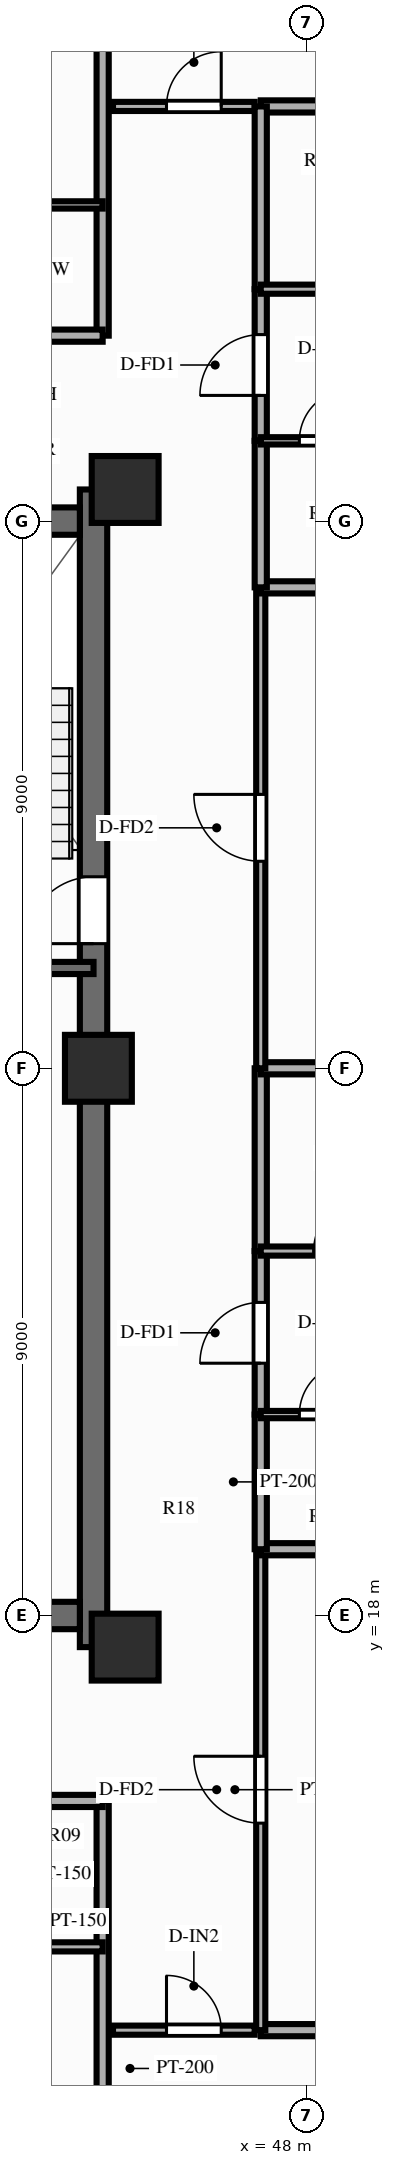
"""IFC4 building model, lengths in metres.
Left out: names, types, materials, properties, quantities, classifications, styles, units other than length and angle.
Written with IfcOpenShell. Run it as: python <this file> out.ifc"""

import sys

from ifc_helpers import new_model, si_unit, direction, frame, frame_2d, origin, origin_2d, place, context, subcontext, project, spatial, rectangle, extrude, source, transform, mapped, element, fill, save


model = new_model("IFC4")
c1 = context("Model", 3, precision=1e-05, world=origin(), true_north=direction((0.0, 1.0)))
c2 = subcontext(c1, "Body", "Model", "MODEL_VIEW")
j1 = project(units=[si_unit("LENGTHUNIT", "METRE"), si_unit("PLANEANGLEUNIT", "RADIAN")], contexts=[c1])
p1 = place(None, origin())
s1 = spatial("IfcSite", under=j1, at=p1, CompositionType="ELEMENT")
p2 = place(p1, origin())
s2 = spatial("IfcBuilding", under=s1, at=p2, CompositionType="ELEMENT")
p3 = place(p2, frame((0.0, 0.0, 192.7)))
s3 = spatial("IfcBuildingStorey", under=s2, at=p3, CompositionType="ELEMENT", Elevation=192.7)
p4 = place(p3, frame((44.5, 17.48, 0.0), z_axis=(0.0, 0.0, 1.0), x_axis=(0.0, 1.0, 0.0)))
e1 = element("IfcWall", 1, at=p4, inside=s3, PredefinedType="SHEAR", context=c2, shape_type="SweptSolid", body=[
    extrude(rectangle(XDim=19.04, YDim=0.45, at=frame_2d((9.52, 0.0))), origin(), (0.0, 0.0, 1.0), 3.9),
])
p5 = place(p4, frame((12.67, 0.0, 0.0), z_axis=(0.0, 0.0, 1.0), x_axis=(-1.0, 0.0, 0.0)))
e2 = element("IfcOpeningElement", 2, at=p5, cuts=e1, PredefinedType="OPENING", context=c2, shape_type="SweptSolid", body=[
    extrude(rectangle(XDim=1.1, YDim=2.15, at=frame_2d((0.55, 1.075))), frame((0.0, 0.237, 0.0), z_axis=(0.0, -1.0, 0.0), x_axis=(1.0, 0.0, 0.0)), (0.0, 0.0, 1.0), 0.474),
])
p6 = place(p3, frame((31.725, 18.0, 0.0), z_axis=(0.0, 0.0, 1.0), x_axis=(1.0, 0.0, 0.0)))
e3 = element("IfcWall", 3, at=p6, inside=s3, PredefinedType="SHEAR", context=c2, shape_type="SweptSolid", body=[
    extrude(rectangle(XDim=12.55, YDim=0.45, at=frame_2d((6.275, 0.0))), origin(), (0.0, 0.0, 1.0), 3.9),
])
p7 = place(p3, frame((31.725, 36.0, 0.0), z_axis=(0.0, 0.0, 1.0), x_axis=(1.0, 0.0, 0.0)))
e4 = element("IfcWall", 4, at=p7, inside=s3, PredefinedType="SHEAR", context=c2, shape_type="SweptSolid", body=[
    extrude(rectangle(XDim=12.55, YDim=0.45, at=frame_2d((6.275, 0.0))), origin(), (0.0, 0.0, 1.0), 3.9),
])
p8 = place(p7, frame((5.225, 0.0, 0.0), z_axis=(0.0, 0.0, 1.0), x_axis=(-1.0, 0.0, 0.0)))
e5 = element("IfcOpeningElement", 5, at=p8, cuts=e4, PredefinedType="OPENING", context=c2, shape_type="SweptSolid", body=[
    extrude(rectangle(XDim=1.4, YDim=2.15, at=frame_2d((0.7, 1.075))), frame((0.0, 0.237, 0.0), z_axis=(0.0, -1.0, 0.0), x_axis=(1.0, 0.0, 0.0)), (0.0, 0.0, 1.0), 0.474),
])
m1 = source(origin(), c2, "Body", "SweptSolid", [
    extrude(rectangle(XDim=1.1, YDim=1.1, at=origin_2d()), origin(), (0.0, 0.0, 1.0), 3.9),
])
for number, where, z_axis, x_axis in (
    (6, (45.02, 17.48, 0.0), (0.0, 0.0, 1.0), (1.0, 0.0, 0.0)),
    (7, (45.02, 36.52, 0.0), (0.0, 0.0, 1.0), (1.0, 0.0, 0.0)),
    (8, (44.58, 27.0, 0.0), (0.0, 0.0, 1.0), (1.0, 0.0, 0.0)),
):
    element("IfcColumn", number, at=place(p3, frame(where, z_axis=z_axis, x_axis=x_axis)), inside=s3, PredefinedType="COLUMN", context=c2, shape_type="MappedRepresentation", body=[
        mapped(m1, transform((0.0, 0.0, 0.0), scale=1.0)),
    ])
p9 = place(p3, frame((40.57, 28.65, 0.0), z_axis=(0.0, 0.0, 1.0), x_axis=(1.0, 0.0, 0.0)))
e9 = element("IfcWall", 9, at=p9, inside=s3, PredefinedType="SOLIDWALL", context=c2, shape_type="SweptSolid", body=[
    extrude(rectangle(XDim=3.93, YDim=0.2, at=frame_2d((1.965, 0.0))), origin(), (0.0, 0.0, 1.0), 3.69),
])
p10 = place(p3, frame((44.82, 11.18, 0.0), z_axis=(0.0, 0.0, 1.0), x_axis=(1.0, 0.0, 0.0)))
e10 = element("IfcWall", 10, at=p10, inside=s3, PredefinedType="PARTITIONING", context=c2, shape_type="SweptSolid", body=[
    extrude(rectangle(XDim=2.33, YDim=0.15, at=frame_2d((1.165, 0.0))), origin(), (0.0, 0.0, 1.0), 2.24),
])
p11 = place(p10, frame((0.88, 0.0, 0.0)))
e11 = element("IfcOpeningElement", 11, at=p11, cuts=e10, PredefinedType="OPENING", context=c2, shape_type="SweptSolid", body=[
    extrude(rectangle(XDim=0.9, YDim=2.1, at=frame_2d((0.45, 1.05))), frame((0.0, 0.087, 0.0), z_axis=(0.0, -1.0, 0.0), x_axis=(1.0, 0.0, 0.0)), (0.0, 0.0, 1.0), 0.174),
])
p12 = place(p3, frame((44.82, 42.82, 0.0), z_axis=(0.0, 0.0, 1.0), x_axis=(1.0, 0.0, 0.0)))
e12 = element("IfcWall", 12, at=p12, inside=s3, PredefinedType="PARTITIONING", context=c2, shape_type="SweptSolid", body=[
    extrude(rectangle(XDim=2.33, YDim=0.15, at=frame_2d((1.165, 0.0))), origin(), (0.0, 0.0, 1.0), 2.24),
])
p13 = place(p12, frame((0.88, 0.0, 0.0)))
e13 = element("IfcOpeningElement", 13, at=p13, cuts=e12, PredefinedType="OPENING", context=c2, shape_type="SweptSolid", body=[
    extrude(rectangle(XDim=0.9, YDim=2.1, at=frame_2d((0.45, 1.05))), frame((0.0, 0.087, 0.0), z_axis=(0.0, -1.0, 0.0), x_axis=(1.0, 0.0, 0.0)), (0.0, 0.0, 1.0), 0.174),
])
p14 = place(p3, frame((44.65, 14.95, 0.0), z_axis=(0.0, 0.0, 1.0), x_axis=(0.0, -1.0, 0.0)))
e14 = element("IfcWall", 14, at=p14, inside=s3, PredefinedType="PARTITIONING", context=c2, shape_type="SweptSolid", body=[
    extrude(rectangle(XDim=8.8, YDim=0.2, at=frame_2d((4.4, 0.0))), origin(), (0.0, 0.0, 1.0), 2.44),
])
p15 = place(p3, frame((42.022, 14.95, 0.0), z_axis=(0.0, 0.0, 1.0), x_axis=(1.0, 0.0, 0.0)))
e15 = element("IfcWall", 15, at=p15, inside=s3, PredefinedType="PARTITIONING", context=c2, shape_type="SweptSolid", body=[
    extrude(rectangle(XDim=2.628, YDim=0.2, at=frame_2d((1.314, 0.0))), origin(), (0.0, 0.0, 1.0), 3.56),
])
p16 = place(p3, frame((42.022, 12.55, 0.0), z_axis=(0.0, 0.0, 1.0), x_axis=(1.0, 0.0, 0.0)))
e16 = element("IfcWall", 16, at=p16, inside=s3, PredefinedType="PARTITIONING", context=c2, shape_type="SweptSolid", body=[
    extrude(rectangle(XDim=2.628, YDim=0.15, at=frame_2d((1.314, 0.0))), origin(), (0.0, 0.0, 1.0), 3.56),
])
p17 = place(p3, frame((44.65, 39.05, 0.0), z_axis=(0.0, 0.0, 1.0), x_axis=(0.0, 1.0, 0.0)))
e17 = element("IfcWall", 17, at=p17, inside=s3, PredefinedType="PARTITIONING", context=c2, shape_type="SweptSolid", body=[
    extrude(rectangle(XDim=8.8, YDim=0.2, at=frame_2d((4.4, 0.0))), origin(), (0.0, 0.0, 1.0), 2.44),
])
p18 = place(p3, frame((42.188, 39.05, 0.0), z_axis=(0.0, 0.0, 1.0), x_axis=(1.0, 0.0, 0.0)))
e18 = element("IfcWall", 18, at=p18, inside=s3, PredefinedType="PARTITIONING", context=c2, shape_type="SweptSolid", body=[
    extrude(rectangle(XDim=2.462, YDim=0.2, at=frame_2d((1.231, 0.0))), origin(), (0.0, 0.0, 1.0), 3.56),
])
p19 = place(p3, frame((42.188, 41.2, 0.0), z_axis=(0.0, 0.0, 1.0), x_axis=(1.0, 0.0, 0.0)))
e19 = element("IfcWall", 19, at=p19, inside=s3, PredefinedType="PARTITIONING", context=c2, shape_type="SweptSolid", body=[
    extrude(rectangle(XDim=2.462, YDim=0.12, at=frame_2d((1.231, 0.0))), origin(), (0.0, 0.0, 1.0), 3.56),
])
for number, where, z_axis, x_axis in (
    (20, (47.25, 11.18, 0.0), (0.0, 0.0, 1.0), (1.0, 0.0, 0.0)),
    (21, (47.25, 42.82, 0.0), (0.0, 0.0, 1.0), (1.0, 0.0, 0.0)),
):
    element("IfcWall", number, at=place(p3, frame(where, z_axis=z_axis, x_axis=x_axis)), inside=s3, PredefinedType="PARTITIONING", context=c2, shape_type="SweptSolid", body=[
        extrude(rectangle(XDim=10.85, YDim=0.2, at=frame_2d((5.425, 0.0))), origin(), (0.0, 0.0, 1.0), 2.24),
    ])
p20 = place(p3, frame((47.25, 11.18, 0.0), z_axis=(0.0, 0.0, 1.0), x_axis=(0.0, 1.0, 0.0)))
e22 = element("IfcWall", 22, at=p20, inside=s3, PredefinedType="PARTITIONING", context=c2, shape_type="SweptSolid", body=[
    extrude(rectangle(XDim=7.91, YDim=0.15, at=frame_2d((3.955, 0.0))), origin(), (0.0, 0.0, 1.0), 3.56),
])
p21 = place(p20, frame((3.405, 0.0, 0.0)))
e23 = element("IfcOpeningElement", 23, at=p21, cuts=e22, PredefinedType="OPENING", context=c2, shape_type="SweptSolid", body=[
    extrude(rectangle(XDim=1.1, YDim=2.15, at=frame_2d((0.55, 1.075))), frame((0.0, 0.087, 0.0), z_axis=(0.0, -1.0, 0.0), x_axis=(1.0, 0.0, 0.0)), (0.0, 0.0, 1.0), 0.174),
])
p22 = place(p3, frame((47.25, 19.09, 0.0), z_axis=(0.0, 0.0, 1.0), x_axis=(1.0, 0.0, 0.0)))
e24 = element("IfcWall", 24, at=p22, inside=s3, PredefinedType="PARTITIONING", context=c2, shape_type="SweptSolid", body=[
    extrude(rectangle(XDim=10.85, YDim=0.2, at=frame_2d((5.425, 0.0))), origin(), (0.0, 0.0, 1.0), 3.56),
])
p23 = place(p3, frame((47.25, 19.09, 0.0), z_axis=(0.0, 0.0, 1.0), x_axis=(0.0, 1.0, 0.0)))
e25 = element("IfcWall", 25, at=p23, inside=s3, PredefinedType="PARTITIONING", context=c2, shape_type="SweptSolid", body=[
    extrude(rectangle(XDim=2.215, YDim=0.2, at=frame_2d((1.107, 0.0))), origin(), (0.0, 0.0, 1.0), 3.56),
])
p24 = place(p3, frame((47.25, 21.305, 0.0), z_axis=(0.0, 0.0, 1.0), x_axis=(0.0, 1.0, 0.0)))
e26 = element("IfcWall", 26, at=p24, inside=s3, PredefinedType="PARTITIONING", context=c2, shape_type="SweptSolid", body=[
    extrude(rectangle(XDim=2.689, YDim=0.2, at=frame_2d((1.345, 0.0))), origin(), (0.0, 0.0, 1.0), 3.56),
])
p25 = place(p24, frame((0.845, 0.0, 0.0)))
e27 = element("IfcOpeningElement", 27, at=p25, cuts=e26, PredefinedType="OPENING", context=c2, shape_type="SweptSolid", body=[
    extrude(rectangle(XDim=1.0, YDim=2.15, at=frame_2d((0.5, 1.075))), frame((0.0, 0.112, 0.0), z_axis=(0.0, -1.0, 0.0), x_axis=(1.0, 0.0, 0.0)), (0.0, 0.0, 1.0), 0.224),
])
p26 = place(p3, frame((47.25, 23.994, 0.0), z_axis=(0.0, 0.0, 1.0), x_axis=(0.0, 1.0, 0.0)))
e28 = element("IfcWall", 28, at=p26, inside=s3, PredefinedType="PARTITIONING", context=c2, shape_type="SweptSolid", body=[
    extrude(rectangle(XDim=3.006, YDim=0.2, at=frame_2d((1.503, 0.0))), origin(), (0.0, 0.0, 1.0), 3.56),
])
p27 = place(p3, frame((47.25, 21.305, 0.0), z_axis=(0.0, 0.0, 1.0), x_axis=(1.0, 0.0, 0.0)))
e29 = element("IfcWall", 29, at=p27, inside=s3, PredefinedType="PARTITIONING", context=c2, shape_type="SweptSolid", body=[
    extrude(rectangle(XDim=2.12, YDim=0.12, at=frame_2d((1.06, 0.0))), origin(), (0.0, 0.0, 1.0), 3.56),
])
p28 = place(p27, frame((0.635, 0.0, 0.0)))
e30 = element("IfcOpeningElement", 30, at=p28, cuts=e29, PredefinedType="OPENING", context=c2, shape_type="SweptSolid", body=[
    extrude(rectangle(XDim=0.85, YDim=2.05, at=frame_2d((0.425, 1.025))), frame((0.0, 0.072, 0.0), z_axis=(0.0, -1.0, 0.0), x_axis=(1.0, 0.0, 0.0)), (0.0, 0.0, 1.0), 0.144),
])
p29 = place(p3, frame((47.25, 23.994, 0.0), z_axis=(0.0, 0.0, 1.0), x_axis=(1.0, 0.0, 0.0)))
e31 = element("IfcWall", 31, at=p29, inside=s3, PredefinedType="PARTITIONING", context=c2, shape_type="SweptSolid", body=[
    extrude(rectangle(XDim=2.64, YDim=0.15, at=frame_2d((1.32, 0.0))), origin(), (0.0, 0.0, 1.0), 3.56),
])
p30 = place(p29, frame((0.87, 0.0, 0.0)))
e32 = element("IfcOpeningElement", 32, at=p30, cuts=e31, PredefinedType="OPENING", context=c2, shape_type="SweptSolid", body=[
    extrude(rectangle(XDim=0.9, YDim=2.1, at=frame_2d((0.45, 1.05))), frame((0.0, 0.087, 0.0), z_axis=(0.0, -1.0, 0.0), x_axis=(1.0, 0.0, 0.0)), (0.0, 0.0, 1.0), 0.174),
])
p31 = place(p3, frame((47.25, 27.0, 0.0), z_axis=(0.0, 0.0, 1.0), x_axis=(1.0, 0.0, 0.0)))
e33 = element("IfcWall", 33, at=p31, inside=s3, PredefinedType="PARTITIONING", context=c2, shape_type="SweptSolid", body=[
    extrude(rectangle(XDim=10.85, YDim=0.2, at=frame_2d((5.425, 0.0))), origin(), (0.0, 0.0, 1.0), 3.56),
])
p32 = place(p3, frame((47.25, 27.0, 0.0), z_axis=(0.0, 0.0, 1.0), x_axis=(0.0, 1.0, 0.0)))
e34 = element("IfcWall", 34, at=p32, inside=s3, PredefinedType="PARTITIONING", context=c2, shape_type="SweptSolid", body=[
    extrude(rectangle(XDim=7.91, YDim=0.15, at=frame_2d((3.955, 0.0))), origin(), (0.0, 0.0, 1.0), 3.56),
])
p33 = place(p32, frame((3.405, 0.0, 0.0)))
e35 = element("IfcOpeningElement", 35, at=p33, cuts=e34, PredefinedType="OPENING", context=c2, shape_type="SweptSolid", body=[
    extrude(rectangle(XDim=1.1, YDim=2.15, at=frame_2d((0.55, 1.075))), frame((0.0, 0.087, 0.0), z_axis=(0.0, -1.0, 0.0), x_axis=(1.0, 0.0, 0.0)), (0.0, 0.0, 1.0), 0.174),
])
p34 = place(p3, frame((47.25, 34.91, 0.0), z_axis=(0.0, 0.0, 1.0), x_axis=(1.0, 0.0, 0.0)))
e36 = element("IfcWall", 36, at=p34, inside=s3, PredefinedType="PARTITIONING", context=c2, shape_type="SweptSolid", body=[
    extrude(rectangle(XDim=10.85, YDim=0.2, at=frame_2d((5.425, 0.0))), origin(), (0.0, 0.0, 1.0), 3.56),
])
p35 = place(p3, frame((47.25, 34.91, 0.0), z_axis=(0.0, 0.0, 1.0), x_axis=(0.0, 1.0, 0.0)))
e37 = element("IfcWall", 37, at=p35, inside=s3, PredefinedType="PARTITIONING", context=c2, shape_type="SweptSolid", body=[
    extrude(rectangle(XDim=2.41, YDim=0.2, at=frame_2d((1.205, 0.0))), origin(), (0.0, 0.0, 1.0), 3.56),
])
p36 = place(p3, frame((47.25, 37.32, 0.0), z_axis=(0.0, 0.0, 1.0), x_axis=(0.0, 1.0, 0.0)))
e38 = element("IfcWall", 38, at=p36, inside=s3, PredefinedType="PARTITIONING", context=c2, shape_type="SweptSolid", body=[
    extrude(rectangle(XDim=2.494, YDim=0.2, at=frame_2d((1.247, 0.0))), origin(), (0.0, 0.0, 1.0), 3.56),
])
p37 = place(p36, frame((0.747, 0.0, 0.0)))
e39 = element("IfcOpeningElement", 39, at=p37, cuts=e38, PredefinedType="OPENING", context=c2, shape_type="SweptSolid", body=[
    extrude(rectangle(XDim=1.0, YDim=2.15, at=frame_2d((0.5, 1.075))), frame((0.0, 0.112, 0.0), z_axis=(0.0, -1.0, 0.0), x_axis=(1.0, 0.0, 0.0)), (0.0, 0.0, 1.0), 0.224),
])
p38 = place(p3, frame((47.25, 39.814, 0.0), z_axis=(0.0, 0.0, 1.0), x_axis=(0.0, 1.0, 0.0)))
e40 = element("IfcWall", 40, at=p38, inside=s3, PredefinedType="PARTITIONING", context=c2, shape_type="SweptSolid", body=[
    extrude(rectangle(XDim=3.006, YDim=0.2, at=frame_2d((1.503, 0.0))), origin(), (0.0, 0.0, 1.0), 3.56),
])
p39 = place(p3, frame((47.25, 37.32, 0.0), z_axis=(0.0, 0.0, 1.0), x_axis=(1.0, 0.0, 0.0)))
e41 = element("IfcWall", 41, at=p39, inside=s3, PredefinedType="PARTITIONING", context=c2, shape_type="SweptSolid", body=[
    extrude(rectangle(XDim=2.12, YDim=0.12, at=frame_2d((1.06, 0.0))), origin(), (0.0, 0.0, 1.0), 3.56),
])
p40 = place(p39, frame((0.635, 0.0, 0.0)))
e42 = element("IfcOpeningElement", 42, at=p40, cuts=e41, PredefinedType="OPENING", context=c2, shape_type="SweptSolid", body=[
    extrude(rectangle(XDim=0.85, YDim=2.05, at=frame_2d((0.425, 1.025))), frame((0.0, 0.072, 0.0), z_axis=(0.0, -1.0, 0.0), x_axis=(1.0, 0.0, 0.0)), (0.0, 0.0, 1.0), 0.144),
])
p41 = place(p3, frame((47.25, 39.814, 0.0), z_axis=(0.0, 0.0, 1.0), x_axis=(1.0, 0.0, 0.0)))
e43 = element("IfcWall", 43, at=p41, inside=s3, PredefinedType="PARTITIONING", context=c2, shape_type="SweptSolid", body=[
    extrude(rectangle(XDim=2.88, YDim=0.15, at=frame_2d((1.44, 0.0))), origin(), (0.0, 0.0, 1.0), 3.56),
])
p42 = place(p41, frame((0.99, 0.0, 0.0)))
e44 = element("IfcOpeningElement", 44, at=p42, cuts=e43, PredefinedType="OPENING", context=c2, shape_type="SweptSolid", body=[
    extrude(rectangle(XDim=0.9, YDim=2.1, at=frame_2d((0.45, 1.05))), frame((0.0, 0.087, 0.0), z_axis=(0.0, -1.0, 0.0), x_axis=(1.0, 0.0, 0.0)), (0.0, 0.0, 1.0), 0.174),
])
m2 = source(origin(), c2, "Body", "SweptSolid", [
    extrude(rectangle(XDim=1.1, YDim=2.15, at=frame_2d((0.55, 1.075))), frame((0.0, 0.025, 0.0), z_axis=(0.0, -1.0, 0.0), x_axis=(1.0, 0.0, 0.0)), (0.0, 0.0, 1.0), 0.05),
])
p43 = place(p5, origin())
e45 = element("IfcDoor", 45, at=p43, inside=s3, OperationType="SINGLE_SWING_RIGHT", PredefinedType="DOOR", context=c2, shape_type="MappedRepresentation", body=[
    mapped(m2, transform((0.0, 0.0, 0.0), scale=1.0)),
])
fill(e2, e45)
m3 = source(origin(), c2, "Body", "SweptSolid", [
    extrude(rectangle(XDim=0.9, YDim=2.1, at=frame_2d((0.45, 1.05))), frame((0.0, 0.025, 0.0), z_axis=(0.0, -1.0, 0.0), x_axis=(1.0, 0.0, 0.0)), (0.0, 0.0, 1.0), 0.05),
])
p44 = place(p11, origin())
e46 = element("IfcDoor", 46, at=p44, inside=s3, OperationType="SINGLE_SWING_LEFT", PredefinedType="DOOR", context=c2, shape_type="MappedRepresentation", body=[
    mapped(m3, transform((0.0, 0.0, 0.0), scale=1.0)),
])
fill(e11, e46)
p45 = place(p13, origin())
e47 = element("IfcDoor", 47, at=p45, inside=s3, OperationType="SINGLE_SWING_RIGHT", PredefinedType="DOOR", context=c2, shape_type="MappedRepresentation", body=[
    mapped(m3, transform((0.0, 0.0, 0.0), scale=1.0)),
])
fill(e13, e47)
p46 = place(p21, origin())
e48 = element("IfcDoor", 48, at=p46, inside=s3, OperationType="SINGLE_SWING_RIGHT", PredefinedType="DOOR", context=c2, shape_type="MappedRepresentation", body=[
    mapped(m2, transform((0.0, 0.0, 0.0), scale=1.0)),
])
fill(e23, e48)
m4 = source(origin(), c2, "Body", "SweptSolid", [
    extrude(rectangle(XDim=1.0, YDim=2.15, at=frame_2d((0.5, 1.075))), frame((0.0, 0.025, 0.0), z_axis=(0.0, -1.0, 0.0), x_axis=(1.0, 0.0, 0.0)), (0.0, 0.0, 1.0), 0.05),
])
p47 = place(p25, origin())
e49 = element("IfcDoor", 49, at=p47, inside=s3, OperationType="SINGLE_SWING_LEFT", PredefinedType="DOOR", context=c2, shape_type="MappedRepresentation", body=[
    mapped(m4, transform((0.0, 0.0, 0.0), scale=1.0)),
])
fill(e27, e49)
m5 = source(origin(), c2, "Body", "SweptSolid", [
    extrude(rectangle(XDim=0.85, YDim=2.05, at=frame_2d((0.425, 1.025))), frame((0.0, 0.025, 0.0), z_axis=(0.0, -1.0, 0.0), x_axis=(1.0, 0.0, 0.0)), (0.0, 0.0, 1.0), 0.05),
])
p48 = place(p28, origin())
e50 = element("IfcDoor", 50, at=p48, inside=s3, OperationType="SINGLE_SWING_RIGHT", PredefinedType="DOOR", context=c2, shape_type="MappedRepresentation", body=[
    mapped(m5, transform((0.0, 0.0, 0.0), scale=1.0)),
])
fill(e30, e50)
p49 = place(p30, origin())
e51 = element("IfcDoor", 51, at=p49, inside=s3, OperationType="SINGLE_SWING_RIGHT", PredefinedType="DOOR", context=c2, shape_type="MappedRepresentation", body=[
    mapped(m3, transform((0.0, 0.0, 0.0), scale=1.0)),
])
fill(e32, e51)
p50 = place(p33, origin())
e52 = element("IfcDoor", 52, at=p50, inside=s3, OperationType="SINGLE_SWING_RIGHT", PredefinedType="DOOR", context=c2, shape_type="MappedRepresentation", body=[
    mapped(m2, transform((0.0, 0.0, 0.0), scale=1.0)),
])
fill(e35, e52)
p51 = place(p37, origin())
e53 = element("IfcDoor", 53, at=p51, inside=s3, OperationType="SINGLE_SWING_LEFT", PredefinedType="DOOR", context=c2, shape_type="MappedRepresentation", body=[
    mapped(m4, transform((0.0, 0.0, 0.0), scale=1.0)),
])
fill(e39, e53)
p52 = place(p40, origin())
e54 = element("IfcDoor", 54, at=p52, inside=s3, OperationType="SINGLE_SWING_RIGHT", PredefinedType="DOOR", context=c2, shape_type="MappedRepresentation", body=[
    mapped(m5, transform((0.0, 0.0, 0.0), scale=1.0)),
])
fill(e42, e54)
save(model, sys.argv[1])
